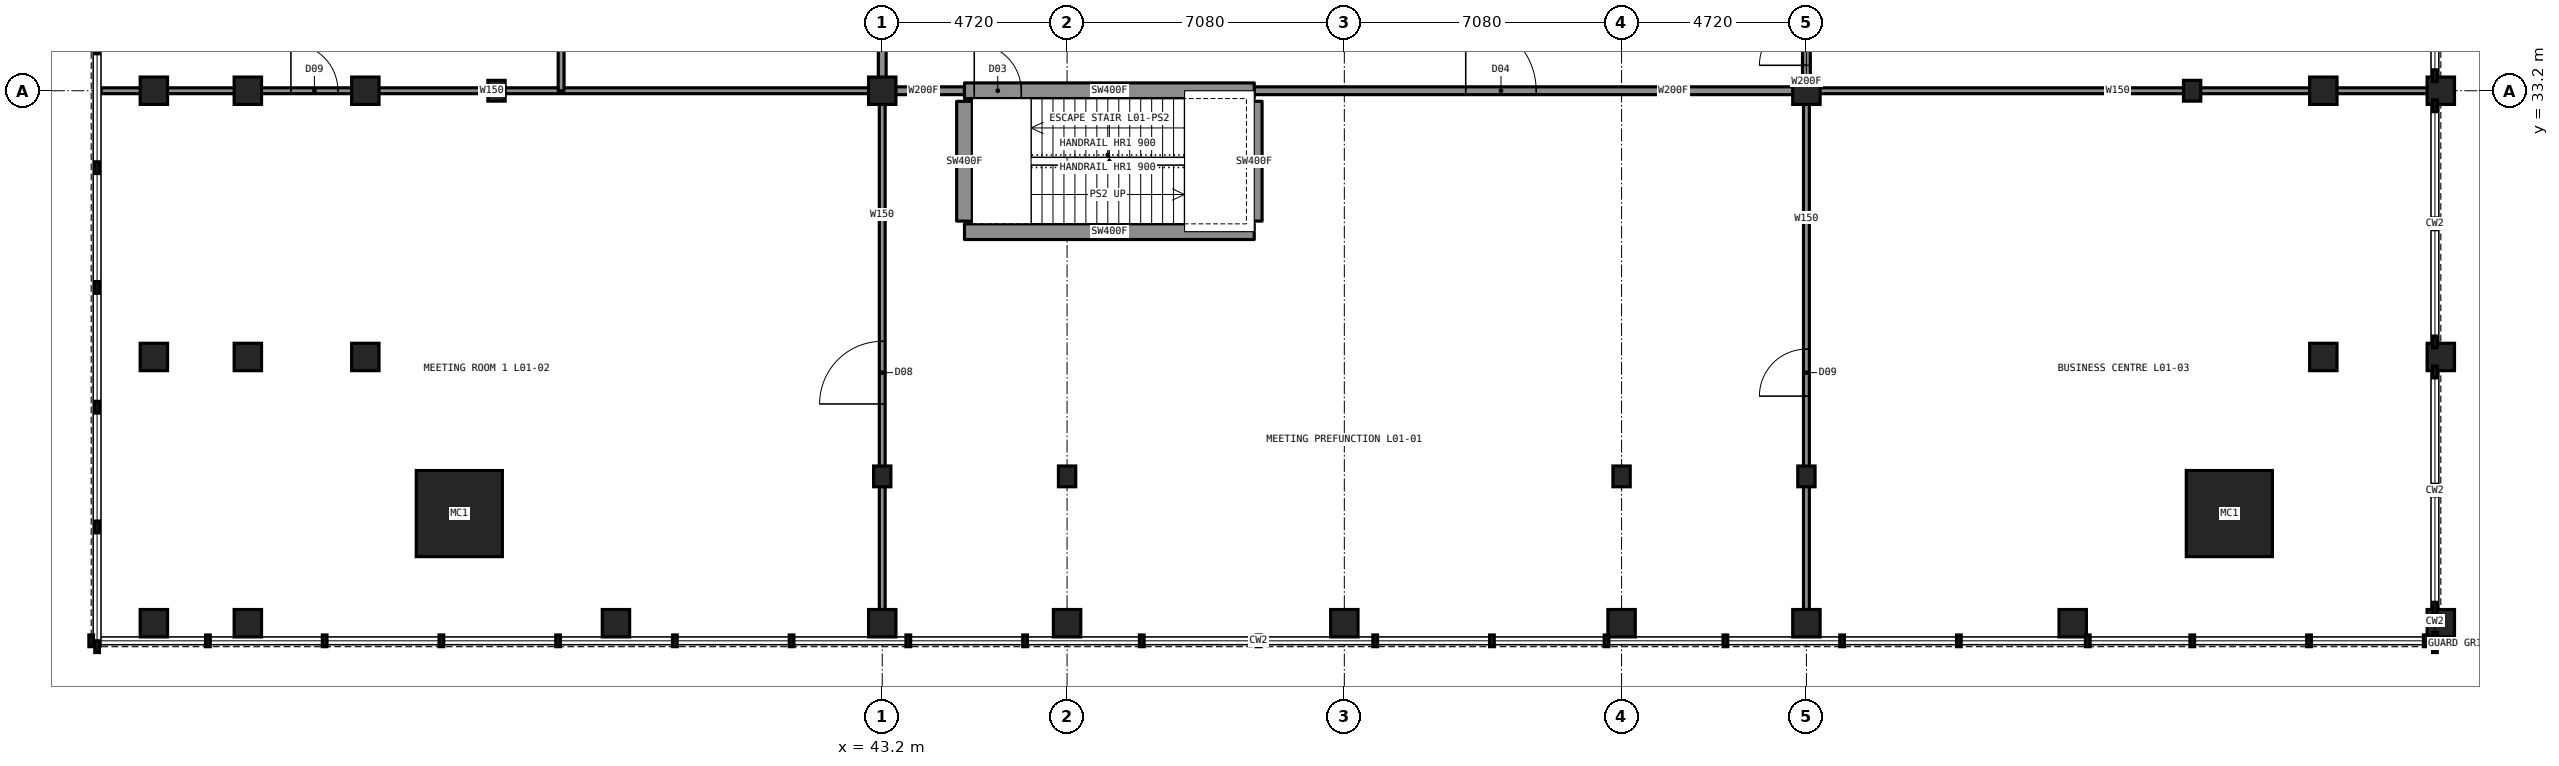
"""IFC4 building model, lengths in metres.
Left out: names, types, materials, properties, quantities, classifications, styles, units other than length and angle.
Written with IfcOpenShell. Run it as: python <this file> out.ifc"""

import sys

from ifc_helpers import new_model, si_unit, direction, frame, frame_2d, origin, origin_2d, place, context, subcontext, project, spatial, rectangle, hollow_rectangle, i_section, extrude, element, fill, save


model = new_model("IFC4")
c1 = context("Model", 3, precision=1e-05, world=origin(), true_north=direction((0.0, 1.0)))
c2 = subcontext(c1, "Body", "Model", "MODEL_VIEW")
j1 = project(units=[si_unit("LENGTHUNIT", "METRE"), si_unit("PLANEANGLEUNIT", "RADIAN")], contexts=[c1])
p1 = place(None, origin())
s1 = spatial("IfcSite", under=j1, at=p1, CompositionType="ELEMENT")
p2 = place(p1, origin())
s2 = spatial("IfcBuilding", under=s1, at=p2, CompositionType="ELEMENT")
p3 = place(p2, frame((0.0, 0.0, 5.6)))
s3 = spatial("IfcBuildingStorey", under=s2, at=p3, CompositionType="ELEMENT", Elevation=5.6)
for number, where, z_axis, x_axis in (
    (1, (33.35, 33.2, 0.0), (0.0, 0.0, 1.0), (1.0, 0.0, 0.0)),
    (2, (43.2, 23.35, 0.0), (0.0, 0.0, 1.0), (1.0, 0.0, 0.0)),
    (3, (47.92, 23.35, 0.0), (0.0, 0.0, 1.0), (1.0, 0.0, 0.0)),
    (4, (62.08, 23.35, 0.0), (0.0, 0.0, 1.0), (1.0, 0.0, 0.0)),
    (5, (66.8, 23.35, 0.0), (0.0, 0.0, 1.0), (1.0, 0.0, 0.0)),
    (6, (76.65, 33.2, 0.0), (0.0, 0.0, 1.0), (1.0, 0.0, 0.0)),
):
    element("IfcColumn", number, at=place(p3, frame(where, z_axis=z_axis, x_axis=x_axis)), inside=s3, PredefinedType="COLUMN", context=c2, shape_type="SweptSolid", body=[
        extrude(i_section(OverallWidth=0.442, OverallDepth=0.531, WebThickness=0.066, FlangeThickness=0.106, at=origin_2d()), origin(), (0.0, 0.0, 1.0), 5.4),
    ])
for number, where, z_axis, x_axis in (
    (7, (43.2, 33.2, 0.0), (0.0, 0.0, 1.0), (1.0, 0.0, 0.0)),
    (8, (66.8, 33.2, 0.0), (0.0, 0.0, 1.0), (1.0, 0.0, 0.0)),
):
    element("IfcColumn", number, at=place(p3, frame(where, z_axis=z_axis, x_axis=x_axis)), inside=s3, PredefinedType="COLUMN", context=c2, shape_type="SweptSolid", body=[
        extrude(hollow_rectangle(XDim=0.7, YDim=0.7, WallThickness=0.06, at=origin_2d()), origin(), (0.0, 0.0, 1.0), 5.4),
    ])
for number, where, z_axis, x_axis in (
    (9, (32.4, 22.4, 0.0), (0.0, 0.0, 1.0), (1.0, 0.0, 0.0)),
    (10, (77.6, 22.4, 0.0), (0.0, 0.0, 1.0), (1.0, 0.0, 0.0)),
):
    element("IfcColumn", number, at=place(p3, frame(where, z_axis=z_axis, x_axis=x_axis)), inside=s3, PredefinedType="COLUMN", context=c2, shape_type="SweptSolid", body=[
        extrude(hollow_rectangle(XDim=2.2, YDim=2.2, WallThickness=0.15, at=origin_2d()), origin(), (0.0, 0.0, 1.0), 5.4),
    ])
for number, where, z_axis, x_axis in (
    (11, (24.6, 19.6, 0.0), (0.0, 0.0, 1.0), (1.0, 0.0, 0.0)),
    (12, (24.6, 26.4, 0.0), (0.0, 0.0, 1.0), (1.0, 0.0, 0.0)),
    (13, (24.6, 33.2, 0.0), (0.0, 0.0, 1.0), (1.0, 0.0, 0.0)),
    (14, (27.0, 19.6, 0.0), (0.0, 0.0, 1.0), (1.0, 0.0, 0.0)),
    (15, (27.0, 26.4, 0.0), (0.0, 0.0, 1.0), (1.0, 0.0, 0.0)),
    (16, (27.0, 33.2, 0.0), (0.0, 0.0, 1.0), (1.0, 0.0, 0.0)),
    (17, (30.0, 26.4, 0.0), (0.0, 0.0, 1.0), (1.0, 0.0, 0.0)),
    (18, (30.0, 33.2, 0.0), (0.0, 0.0, 1.0), (1.0, 0.0, 0.0)),
    (19, (36.4, 19.6, 0.0), (0.0, 0.0, 1.0), (1.0, 0.0, 0.0)),
    (20, (43.2, 19.6, 0.0), (0.0, 0.0, 1.0), (1.0, 0.0, 0.0)),
    (21, (47.92, 19.6, 0.0), (0.0, 0.0, 1.0), (1.0, 0.0, 0.0)),
    (22, (55.0, 19.6, 0.0), (0.0, 0.0, 1.0), (1.0, 0.0, 0.0)),
    (23, (62.08, 19.6, 0.0), (0.0, 0.0, 1.0), (1.0, 0.0, 0.0)),
    (24, (66.8, 19.6, 0.0), (0.0, 0.0, 1.0), (1.0, 0.0, 0.0)),
    (25, (73.6, 19.6, 0.0), (0.0, 0.0, 1.0), (1.0, 0.0, 0.0)),
    (26, (80.0, 26.4, 0.0), (0.0, 0.0, 1.0), (1.0, 0.0, 0.0)),
    (27, (80.0, 33.2, 0.0), (0.0, 0.0, 1.0), (1.0, 0.0, 0.0)),
    (28, (83.0, 19.6, 0.0), (0.0, 0.0, 1.0), (1.0, 0.0, 0.0)),
    (29, (83.0, 26.4, 0.0), (0.0, 0.0, 1.0), (1.0, 0.0, 0.0)),
    (30, (83.0, 33.2, 0.0), (0.0, 0.0, 1.0), (1.0, 0.0, 0.0)),
):
    element("IfcColumn", number, at=place(p3, frame(where, z_axis=z_axis, x_axis=x_axis)), inside=s3, PredefinedType="COLUMN", context=c2, shape_type="SweptSolid", body=[
        extrude(rectangle(XDim=0.7, YDim=0.7, at=origin_2d()), origin(), (0.0, 0.0, 1.0), 5.4),
    ])
p4 = place(p3, frame((43.2, 33.2, 0.0), z_axis=(0.0, 0.0, 1.0), x_axis=(1.0, 0.0, 0.0)))
e31 = element("IfcWall", 31, at=p4, inside=s3, PredefinedType="PARTITIONING", context=c2, shape_type="SweptSolid", body=[
    extrude(rectangle(XDim=2.1, YDim=0.2, at=frame_2d((1.05, 0.0))), origin(), (0.0, 0.0, 1.0), 5.05),
])
p5 = place(p3, frame((52.7, 33.2, 0.0), z_axis=(0.0, 0.0, 1.0), x_axis=(1.0, 0.0, 0.0)))
e32 = element("IfcWall", 32, at=p5, inside=s3, PredefinedType="PARTITIONING", context=c2, shape_type="SweptSolid", body=[
    extrude(rectangle(XDim=14.1, YDim=0.2, at=frame_2d((7.05, 0.0))), origin(), (0.0, 0.0, 1.0), 5.05),
])
p6 = place(p5, frame((5.4, 0.0, 0.0)))
e33 = element("IfcOpeningElement", 33, at=p6, cuts=e32, PredefinedType="OPENING", context=c2, shape_type="SweptSolid", body=[
    extrude(rectangle(XDim=1.8, YDim=2.2, at=frame_2d((0.9, 1.1))), frame((0.0, 0.11, 0.0), z_axis=(0.0, -1.0, 0.0), x_axis=(1.0, 0.0, 0.0)), (0.0, 0.0, 1.0), 0.22),
])
p7 = place(p3, frame((23.255, 33.2, 0.0), z_axis=(0.0, 0.0, 1.0), x_axis=(1.0, 0.0, 0.0)))
e34 = element("IfcWall", 34, at=p7, inside=s3, PredefinedType="PARTITIONING", context=c2, shape_type="SweptSolid", body=[
    extrude(rectangle(XDim=19.945, YDim=0.15, at=frame_2d((9.973, 0.0))), origin(), (0.0, 0.0, 1.0), 5.05),
])
p8 = place(p7, frame((4.845, 0.0, 0.0)))
e35 = element("IfcOpeningElement", 35, at=p8, cuts=e34, PredefinedType="OPENING", context=c2, shape_type="SweptSolid", body=[
    extrude(rectangle(XDim=1.2, YDim=2.2, at=frame_2d((0.6, 1.1))), frame((0.0, 0.085, 0.0), z_axis=(0.0, -1.0, 0.0), x_axis=(1.0, 0.0, 0.0)), (0.0, 0.0, 1.0), 0.17),
])
p9 = place(p3, frame((66.8, 33.2, 0.0), z_axis=(0.0, 0.0, 1.0), x_axis=(1.0, 0.0, 0.0)))
e36 = element("IfcWall", 36, at=p9, inside=s3, PredefinedType="PARTITIONING", context=c2, shape_type="SweptSolid", body=[
    extrude(rectangle(XDim=15.9, YDim=0.15, at=frame_2d((7.95, 0.0))), origin(), (0.0, 0.0, 1.0), 5.05),
])
p10 = place(p3, frame((45.3, 33.2, 0.0), z_axis=(0.0, 0.0, 1.0), x_axis=(1.0, 0.0, 0.0)))
e37 = element("IfcWall", 37, at=p10, inside=s3, PredefinedType="SHEAR", context=c2, shape_type="SweptSolid", body=[
    extrude(rectangle(XDim=7.4, YDim=0.4, at=frame_2d((3.7, 0.0))), origin(), (0.0, 0.0, 1.0), 5.4),
])
p11 = place(p10, frame((0.25, 0.0, 0.0)))
e38 = element("IfcOpeningElement", 38, at=p11, cuts=e37, PredefinedType="OPENING", context=c2, shape_type="SweptSolid", body=[
    extrude(rectangle(XDim=1.2, YDim=2.2, at=frame_2d((0.6, 1.1))), frame((0.0, 0.21, 0.0), z_axis=(0.0, -1.0, 0.0), x_axis=(1.0, 0.0, 0.0)), (0.0, 0.0, 1.0), 0.42),
])
p12 = place(p3, frame((45.3, 29.6, 0.0), z_axis=(0.0, 0.0, 1.0), x_axis=(1.0, 0.0, 0.0)))
e39 = element("IfcWall", 39, at=p12, inside=s3, PredefinedType="SHEAR", context=c2, shape_type="SweptSolid", body=[
    extrude(rectangle(XDim=7.4, YDim=0.4, at=frame_2d((3.7, 0.0))), origin(), (0.0, 0.0, 1.0), 5.4),
])
p13 = place(p3, frame((43.2, 33.2, 0.0), z_axis=(0.0, 0.0, 1.0), x_axis=(0.0, 1.0, 0.0)))
e40 = element("IfcWall", 40, at=p13, inside=s3, PredefinedType="PARTITIONING", context=c2, shape_type="SweptSolid", body=[
    extrude(rectangle(XDim=14.1, YDim=0.2, at=frame_2d((7.05, 0.0))), origin(), (0.0, 0.0, 1.0), 5.05),
])
p14 = place(p13, frame((12.4, 0.0, 0.0)))
e41 = element("IfcOpeningElement", 41, at=p14, cuts=e40, PredefinedType="OPENING", context=c2, shape_type="SweptSolid", body=[
    extrude(rectangle(XDim=1.0, YDim=2.1, at=frame_2d((0.5, 1.05))), frame((0.0, 0.11, 0.0), z_axis=(0.0, -1.0, 0.0), x_axis=(1.0, 0.0, 0.0)), (0.0, 0.0, 1.0), 0.22),
])
p15 = place(p13, frame((2.45, 0.0, 0.0)))
e42 = element("IfcOpeningElement", 42, at=p15, cuts=e40, PredefinedType="OPENING", context=c2, shape_type="SweptSolid", body=[
    extrude(rectangle(XDim=0.9, YDim=2.1, at=frame_2d((0.45, 1.05))), frame((0.0, 0.11, 0.0), z_axis=(0.0, -1.0, 0.0), x_axis=(1.0, 0.0, 0.0)), (0.0, 0.0, 1.0), 0.22),
])
p16 = place(p13, frame((8.25, 0.0, 0.0)))
e43 = element("IfcOpeningElement", 43, at=p16, cuts=e40, PredefinedType="OPENING", context=c2, shape_type="SweptSolid", body=[
    extrude(rectangle(XDim=0.9, YDim=2.1, at=frame_2d((0.45, 1.05))), frame((0.0, 0.11, 0.0), z_axis=(0.0, -1.0, 0.0), x_axis=(1.0, 0.0, 0.0)), (0.0, 0.0, 1.0), 0.22),
])
p17 = place(p3, frame((43.2, 19.3, 0.0), z_axis=(0.0, 0.0, 1.0), x_axis=(0.0, 1.0, 0.0)))
e44 = element("IfcWall", 44, at=p17, inside=s3, PredefinedType="PARTITIONING", context=c2, shape_type="SweptSolid", body=[
    extrude(rectangle(XDim=13.9, YDim=0.15, at=frame_2d((6.95, 0.0))), origin(), (0.0, 0.0, 1.0), 5.05),
])
p18 = place(p17, frame((5.9, 0.0, 0.0)))
e45 = element("IfcOpeningElement", 45, at=p18, cuts=e44, PredefinedType="OPENING", context=c2, shape_type="SweptSolid", body=[
    extrude(rectangle(XDim=1.6, YDim=2.4, at=frame_2d((0.8, 1.2))), frame((0.0, 0.085, 0.0), z_axis=(0.0, -1.0, 0.0), x_axis=(1.0, 0.0, 0.0)), (0.0, 0.0, 1.0), 0.17),
])
p19 = place(p3, frame((52.7, 29.87, 0.0), z_axis=(0.0, 0.0, 1.0), x_axis=(0.0, 1.0, 0.0)))
e46 = element("IfcWall", 46, at=p19, inside=s3, PredefinedType="SHEAR", context=c2, shape_type="SweptSolid", body=[
    extrude(rectangle(XDim=3.06, YDim=0.4, at=frame_2d((1.53, 0.0))), origin(), (0.0, 0.0, 1.0), 5.4),
])
p20 = place(p3, frame((35.0, 33.2, 0.0), z_axis=(0.0, 0.0, 1.0), x_axis=(0.0, 1.0, 0.0)))
e47 = element("IfcWall", 47, at=p20, inside=s3, PredefinedType="PARTITIONING", context=c2, shape_type="SweptSolid", body=[
    extrude(rectangle(XDim=23.6, YDim=0.15, at=frame_2d((11.8, 0.0))), origin(), (0.0, 0.0, 1.0), 5.05),
])
p21 = place(p3, frame((45.3, 29.87, 0.0), z_axis=(0.0, 0.0, 1.0), x_axis=(0.0, 1.0, 0.0)))
e48 = element("IfcWall", 48, at=p21, inside=s3, PredefinedType="SHEAR", context=c2, shape_type="SweptSolid", body=[
    extrude(rectangle(XDim=3.06, YDim=0.4, at=frame_2d((1.53, 0.0))), origin(), (0.0, 0.0, 1.0), 5.4),
])
p22 = place(p3, frame((66.8, 33.2, 0.0), z_axis=(0.0, 0.0, 1.0), x_axis=(0.0, 1.0, 0.0)))
e49 = element("IfcWall", 49, at=p22, inside=s3, PredefinedType="PARTITIONING", context=c2, shape_type="SweptSolid", body=[
    extrude(rectangle(XDim=2.1, YDim=0.2, at=frame_2d((1.05, 0.0))), origin(), (0.0, 0.0, 1.0), 5.05),
])
p23 = place(p22, frame((0.65, 0.0, 0.0)))
e50 = element("IfcOpeningElement", 50, at=p23, cuts=e49, PredefinedType="OPENING", context=c2, shape_type="SweptSolid", body=[
    extrude(rectangle(XDim=1.2, YDim=2.2, at=frame_2d((0.6, 1.1))), frame((0.0, 0.11, 0.0), z_axis=(0.0, -1.0, 0.0), x_axis=(1.0, 0.0, 0.0)), (0.0, 0.0, 1.0), 0.22),
])
p24 = place(p3, frame((66.8, 19.3, 0.0), z_axis=(0.0, 0.0, 1.0), x_axis=(0.0, 1.0, 0.0)))
e51 = element("IfcWall", 51, at=p24, inside=s3, PredefinedType="PARTITIONING", context=c2, shape_type="SweptSolid", body=[
    extrude(rectangle(XDim=13.9, YDim=0.15, at=frame_2d((6.95, 0.0))), origin(), (0.0, 0.0, 1.0), 5.05),
])
p25 = place(p24, frame((6.1, 0.0, 0.0)))
e52 = element("IfcOpeningElement", 52, at=p25, cuts=e51, PredefinedType="OPENING", context=c2, shape_type="SweptSolid", body=[
    extrude(rectangle(XDim=1.2, YDim=2.2, at=frame_2d((0.6, 1.1))), frame((0.0, 0.085, 0.0), z_axis=(0.0, -1.0, 0.0), x_axis=(1.0, 0.0, 0.0)), (0.0, 0.0, 1.0), 0.17),
])
p26 = place(p11, origin())
e53 = element("IfcDoor", 53, at=p26, inside=s3, OperationType="SINGLE_SWING_LEFT", PredefinedType="DOOR", context=c2, shape_type="SweptSolid", body=[
    extrude(rectangle(XDim=1.2, YDim=2.2, at=frame_2d((0.6, 1.1))), frame((0.0, 0.025, 0.0), z_axis=(0.0, -1.0, 0.0), x_axis=(1.0, 0.0, 0.0)), (0.0, 0.0, 1.0), 0.05),
])
fill(e38, e53)
p27 = place(p6, origin())
e54 = element("IfcDoor", 54, at=p27, inside=s3, OperationType="DOUBLE_DOOR_SINGLE_SWING", PredefinedType="DOOR", context=c2, shape_type="SweptSolid", body=[
    extrude(rectangle(XDim=1.8, YDim=2.2, at=frame_2d((0.9, 1.1))), frame((0.0, 0.025, 0.0), z_axis=(0.0, -1.0, 0.0), x_axis=(1.0, 0.0, 0.0)), (0.0, 0.0, 1.0), 0.05),
])
fill(e33, e54)
p28 = place(p18, origin())
e55 = element("IfcDoor", 55, at=p28, inside=s3, OperationType="DOUBLE_DOOR_SINGLE_SWING", PredefinedType="DOOR", context=c2, shape_type="SweptSolid", body=[
    extrude(rectangle(XDim=1.6, YDim=2.4, at=frame_2d((0.8, 1.2))), frame((0.0, 0.025, 0.0), z_axis=(0.0, -1.0, 0.0), x_axis=(1.0, 0.0, 0.0)), (0.0, 0.0, 1.0), 0.05),
])
fill(e45, e55)
p29 = place(p25, origin())
e56 = element("IfcDoor", 56, at=p29, inside=s3, OperationType="SINGLE_SWING_LEFT", PredefinedType="DOOR", context=c2, shape_type="SweptSolid", body=[
    extrude(rectangle(XDim=1.2, YDim=2.2, at=frame_2d((0.6, 1.1))), frame((0.0, 0.025, 0.0), z_axis=(0.0, -1.0, 0.0), x_axis=(1.0, 0.0, 0.0)), (0.0, 0.0, 1.0), 0.05),
])
fill(e52, e56)
p30 = place(p8, origin())
e57 = element("IfcDoor", 57, at=p30, inside=s3, OperationType="SINGLE_SWING_LEFT", PredefinedType="DOOR", context=c2, shape_type="SweptSolid", body=[
    extrude(rectangle(XDim=1.2, YDim=2.2, at=frame_2d((0.6, 1.1))), frame((0.0, 0.025, 0.0), z_axis=(0.0, -1.0, 0.0), x_axis=(1.0, 0.0, 0.0)), (0.0, 0.0, 1.0), 0.05),
])
fill(e35, e57)
p31 = place(p23, origin())
e58 = element("IfcDoor", 58, at=p31, inside=s3, OperationType="SINGLE_SWING_LEFT", PredefinedType="DOOR", context=c2, shape_type="SweptSolid", body=[
    extrude(rectangle(XDim=1.2, YDim=2.2, at=frame_2d((0.6, 1.1))), frame((0.0, 0.025, 0.0), z_axis=(0.0, -1.0, 0.0), x_axis=(1.0, 0.0, 0.0)), (0.0, 0.0, 1.0), 0.05),
])
fill(e50, e58)
save(model, sys.argv[1])
